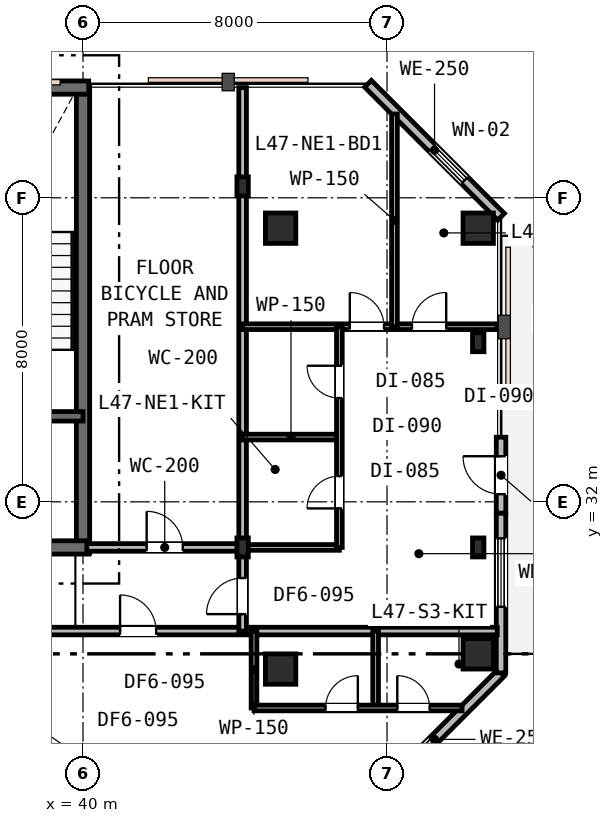
"""IFC4 building model, lengths in metres.
Left out: names, types, materials, properties, quantities, classifications, styles, units other than length and angle.
Written with IfcOpenShell. Run it as: python <this file> out.ifc"""

import sys

from ifc_helpers import new_model, si_unit, direction, frame, frame_2d, origin, origin_2d, place, context, subcontext, project, spatial, rectangle, i_section, extrude, element, fill, save


model = new_model("IFC4")
c1 = context("Model", 3, precision=1e-05, world=origin(), true_north=direction((0.0, 1.0)))
c2 = subcontext(c1, "Body", "Model", "MODEL_VIEW")
j1 = project(units=[si_unit("LENGTHUNIT", "METRE"), si_unit("PLANEANGLEUNIT", "RADIAN")], contexts=[c1])
p1 = place(None, origin())
s1 = spatial("IfcSite", under=j1, at=p1, CompositionType="ELEMENT")
p2 = place(p1, origin())
s2 = spatial("IfcBuilding", under=s1, at=p2, CompositionType="ELEMENT")
p3 = place(p2, frame((0.0, 0.0, 183.0)))
s3 = spatial("IfcBuildingStorey", under=s2, at=p3, CompositionType="ELEMENT", Elevation=183.0)
p4 = place(p3, frame((40.0, 30.65, 0.0), z_axis=(0.0, 0.0, 1.0), x_axis=(0.0, 1.0, 0.0)))
e1 = element("IfcWall", 1, at=p4, inside=s3, PredefinedType="SHEAR", context=c2, shape_type="SweptSolid", body=[
    extrude(rectangle(XDim=12.3, YDim=0.35, at=frame_2d((6.15, 0.0))), origin(), (0.0, 0.0, 1.0), 3.6),
])
p5 = place(p3, frame((15.85, 42.9, 0.0), z_axis=(0.0, 0.0, 1.0), x_axis=(1.0, 0.0, 0.0)))
e2 = element("IfcWall", 2, at=p5, inside=s3, PredefinedType="SHEAR", context=c2, shape_type="SweptSolid", body=[
    extrude(rectangle(XDim=24.3, YDim=0.35, at=frame_2d((12.15, 0.0))), origin(), (0.0, 0.0, 1.0), 3.6),
])
p6 = place(p5, frame((1.6, 0.0, 0.95)))
e3 = element("IfcOpeningElement", 3, at=p6, cuts=e2, PredefinedType="OPENING", context=c2, shape_type="SweptSolid", body=[
    extrude(rectangle(XDim=1.2, YDim=1.6, at=frame_2d((0.6, 0.8))), frame((0.0, 0.185, 0.0), z_axis=(0.0, -1.0, 0.0), x_axis=(1.0, 0.0, 0.0)), (0.0, 0.0, 1.0), 0.37),
])
p7 = place(p5, frame((16.5, 0.0, 0.95)))
e4 = element("IfcOpeningElement", 4, at=p7, cuts=e2, PredefinedType="OPENING", context=c2, shape_type="SweptSolid", body=[
    extrude(rectangle(XDim=1.2, YDim=1.6, at=frame_2d((0.6, 0.8))), frame((0.0, 0.185, 0.0), z_axis=(0.0, -1.0, 0.0), x_axis=(1.0, 0.0, 0.0)), (0.0, 0.0, 1.0), 0.37),
])
p8 = place(p5, frame((21.6, 0.0, 0.95)))
e5 = element("IfcOpeningElement", 5, at=p8, cuts=e2, PredefinedType="OPENING", context=c2, shape_type="SweptSolid", body=[
    extrude(rectangle(XDim=1.2, YDim=1.6, at=frame_2d((0.6, 0.8))), frame((0.0, 0.185, 0.0), z_axis=(0.0, -1.0, 0.0), x_axis=(1.0, 0.0, 0.0)), (0.0, 0.0, 1.0), 0.37),
])
p9 = place(p3, frame((28.95, 30.8, 0.0), z_axis=(0.0, 0.0, 1.0), x_axis=(1.0, 0.0, 0.0)))
e6 = element("IfcWall", 6, at=p9, inside=s3, PredefinedType="SHEAR", context=c2, shape_type="SweptSolid", body=[
    extrude(rectangle(XDim=11.2, YDim=0.35, at=frame_2d((5.6, 0.0))), origin(), (0.0, 0.0, 1.0), 3.6),
])
p10 = place(p9, frame((7.65, 0.0, 0.0)))
e7 = element("IfcOpeningElement", 7, at=p10, cuts=e6, PredefinedType="OPENING", context=c2, shape_type="SweptSolid", body=[
    extrude(rectangle(XDim=1.1, YDim=2.15, at=frame_2d((0.55, 1.075))), frame((0.0, 0.185, 0.0), z_axis=(0.0, -1.0, 0.0), x_axis=(1.0, 0.0, 0.0)), (0.0, 0.0, 1.0), 0.37),
])
p11 = place(p3, frame((33.95, 34.25, 0.0), z_axis=(0.0, 0.0, 1.0), x_axis=(1.0, 0.0, 0.0)))
e8 = element("IfcWall", 8, at=p11, inside=s3, PredefinedType="SHEAR", context=c2, shape_type="SweptSolid", body=[
    extrude(rectangle(XDim=6.05, YDim=0.25, at=frame_2d((3.025, 0.0))), origin(), (0.0, 0.0, 1.0), 3.6),
])
p12 = place(p11, frame((3.7, 0.0, 0.0)))
e9 = element("IfcOpeningElement", 9, at=p12, cuts=e8, PredefinedType="OPENING", context=c2, shape_type="SweptSolid", body=[
    extrude(rectangle(XDim=1.0, YDim=2.15, at=frame_2d((0.5, 1.075))), frame((0.0, 0.135, 0.0), z_axis=(0.0, -1.0, 0.0), x_axis=(1.0, 0.0, 0.0)), (0.0, 0.0, 1.0), 0.27),
])
p13 = place(p11, frame((0.55, 0.0, 0.0)))
e10 = element("IfcOpeningElement", 10, at=p13, cuts=e8, PredefinedType="OPENING", context=c2, shape_type="SweptSolid", body=[
    extrude(rectangle(XDim=1.1, YDim=2.15, at=frame_2d((0.55, 1.075))), frame((0.0, 0.135, 0.0), z_axis=(0.0, -1.0, 0.0), x_axis=(1.0, 0.0, 0.0)), (0.0, 0.0, 1.0), 0.27),
])
for number, where, z_axis, x_axis in (
    (11, (45.2, 27.6, 0.0), (0.0, 0.0, 1.0), (1.0, 0.0, 0.0)),
    (12, (45.2, 39.2, 0.0), (0.0, 0.0, 1.0), (1.0, 0.0, 0.0)),
    (13, (50.4, 28.0, 0.0), (0.0, 0.0, 1.0), (1.0, 0.0, 0.0)),
    (14, (50.4, 39.2, 0.0), (0.0, 0.0, 1.0), (1.0, 0.0, 0.0)),
):
    element("IfcColumn", number, at=place(p3, frame(where, z_axis=z_axis, x_axis=x_axis)), inside=s3, PredefinedType="COLUMN", context=c2, shape_type="SweptSolid", body=[
        extrude(rectangle(XDim=0.8, YDim=0.8, at=origin_2d()), origin(), (0.0, 0.0, 1.0), 3.6),
    ])
for number, where, z_axis, x_axis in (
    (15, (44.2, 30.8, 0.0), (0.0, 0.0, 1.0), (1.0, 0.0, 0.0)),
    (16, (44.2, 40.3, 0.0), (0.0, 0.0, 1.0), (1.0, 0.0, 0.0)),
    (17, (50.4, 30.8, 0.0), (0.0, 0.0, 1.0), (1.0, 0.0, 0.0)),
    (18, (50.4, 36.2, 0.0), (0.0, 0.0, 1.0), (1.0, 0.0, 0.0)),
):
    element("IfcColumn", number, at=place(p3, frame(where, z_axis=z_axis, x_axis=x_axis)), inside=s3, PredefinedType="COLUMN", context=c2, shape_type="SweptSolid", body=[
        extrude(i_section(OverallWidth=0.3, OverallDepth=0.5, WebThickness=0.015, FlangeThickness=0.028, FilletRadius=0.027, at=origin_2d()), origin(), (0.0, 0.0, 1.0), 3.6),
    ])
p14 = place(p3, frame((47.5, 24.0, 0.0), z_axis=(0.0, 0.0, 1.0), x_axis=(0.707106781187, 0.707106781187, 0.0)))
e19 = element("IfcWall", 19, at=p14, inside=s3, PredefinedType="STANDARD", context=c2, shape_type="SweptSolid", body=[
    extrude(rectangle(XDim=4.95, YDim=0.25, at=frame_2d((2.475, 0.0))), origin(), (0.0, 0.0, 1.0), 3.33),
])
p15 = place(p14, frame((1.196, 0.0, 0.85)))
e20 = element("IfcOpeningElement", 20, at=p15, cuts=e19, PredefinedType="OPENING", context=c2, shape_type="SweptSolid", body=[
    extrude(rectangle(XDim=1.2, YDim=1.6, at=frame_2d((0.6, 0.8))), frame((0.0, 0.135, 0.0), z_axis=(0.0, -1.0, 0.0), x_axis=(1.0, 0.0, 0.0)), (0.0, 0.0, 1.0), 0.27),
])
p16 = place(p3, frame((51.0, 31.7, 0.0), z_axis=(0.0, 0.0, 1.0), x_axis=(0.0, 1.0, 0.0)))
e21 = element("IfcWall", 21, at=p16, inside=s3, PredefinedType="STANDARD", context=c2, shape_type="SweptSolid", body=[
    extrude(rectangle(XDim=2.0, YDim=0.25, at=frame_2d((1.0, 0.0))), origin(), (0.0, 0.0, 1.0), 3.33),
])
p17 = place(p16, frame((0.5, 0.0, 0.0)))
e22 = element("IfcOpeningElement", 22, at=p17, cuts=e21, PredefinedType="OPENING", context=c2, shape_type="SweptSolid", body=[
    extrude(rectangle(XDim=1.0, YDim=2.15, at=frame_2d((0.5, 1.075))), frame((0.0, 0.135, 0.0), z_axis=(0.0, -1.0, 0.0), x_axis=(1.0, 0.0, 0.0)), (0.0, 0.0, 1.0), 0.27),
])
p18 = place(p3, frame((51.0, 27.5, 0.0), z_axis=(0.0, 0.0, 1.0), x_axis=(0.0, 1.0, 0.0)))
e23 = element("IfcWall", 23, at=p18, inside=s3, PredefinedType="STANDARD", context=c2, shape_type="SweptSolid", body=[
    extrude(rectangle(XDim=4.2, YDim=0.25, at=frame_2d((2.1, 0.0))), origin(), (0.0, 0.0, 1.0), 3.33),
])
p19 = place(p18, frame((1.74, 0.0, 0.75)))
e24 = element("IfcOpeningElement", 24, at=p19, cuts=e23, PredefinedType="OPENING", context=c2, shape_type="SweptSolid", body=[
    extrude(rectangle(XDim=1.8, YDim=1.85, at=frame_2d((0.9, 0.925))), frame((0.0, 0.135, 0.0), z_axis=(0.0, -1.0, 0.0), x_axis=(1.0, 0.0, 0.0)), (0.0, 0.0, 1.0), 0.27),
])
p20 = place(p3, frame((51.0, 39.5, 0.0), z_axis=(0.0, 0.0, 1.0), x_axis=(-0.707106781187, 0.707106781187, 0.0)))
e25 = element("IfcWall", 25, at=p20, inside=s3, PredefinedType="STANDARD", context=c2, shape_type="SweptSolid", body=[
    extrude(rectangle(XDim=4.95, YDim=0.25, at=frame_2d((2.475, 0.0))), origin(), (0.0, 0.0, 1.0), 3.33),
])
p21 = place(p20, frame((1.357, 0.0, 0.85)))
e26 = element("IfcOpeningElement", 26, at=p21, cuts=e25, PredefinedType="OPENING", context=c2, shape_type="SweptSolid", body=[
    extrude(rectangle(XDim=1.2, YDim=1.6, at=frame_2d((0.6, 0.8))), frame((0.0, 0.135, 0.0), z_axis=(0.0, -1.0, 0.0), x_axis=(1.0, 0.0, 0.0)), (0.0, 0.0, 1.0), 0.27),
])
p22 = place(p3, frame((21.6, 28.6, 0.0), z_axis=(0.0, 0.0, 1.0), x_axis=(1.0, 0.0, 0.0)))
e27 = element("IfcWall", 27, at=p22, inside=s3, PredefinedType="PARTITIONING", context=c2, shape_type="SweptSolid", body=[
    extrude(rectangle(XDim=29.3, YDim=0.2, at=frame_2d((14.65, 0.0))), origin(), (0.0, 0.0, 1.0), 2.92),
])
p23 = place(p22, frame((3.293, 0.0, 0.0)))
e28 = element("IfcOpeningElement", 28, at=p23, cuts=e27, PredefinedType="OPENING", context=c2, shape_type="SweptSolid", body=[
    extrude(rectangle(XDim=0.95, YDim=2.15, at=frame_2d((0.475, 1.075))), frame((0.0, 0.11, 0.0), z_axis=(0.0, -1.0, 0.0), x_axis=(1.0, 0.0, 0.0)), (0.0, 0.0, 1.0), 0.22),
])
p24 = place(p22, frame((10.493, 0.0, 0.0)))
e29 = element("IfcOpeningElement", 29, at=p24, cuts=e27, PredefinedType="OPENING", context=c2, shape_type="SweptSolid", body=[
    extrude(rectangle(XDim=0.95, YDim=2.15, at=frame_2d((0.475, 1.075))), frame((0.0, 0.11, 0.0), z_axis=(0.0, -1.0, 0.0), x_axis=(1.0, 0.0, 0.0)), (0.0, 0.0, 1.0), 0.22),
])
p25 = place(p22, frame((19.375, 0.0, 0.0)))
e30 = element("IfcOpeningElement", 30, at=p25, cuts=e27, PredefinedType="OPENING", context=c2, shape_type="SweptSolid", body=[
    extrude(rectangle(XDim=0.95, YDim=2.15, at=frame_2d((0.475, 1.075))), frame((0.0, 0.11, 0.0), z_axis=(0.0, -1.0, 0.0), x_axis=(1.0, 0.0, 0.0)), (0.0, 0.0, 1.0), 0.22),
])
p26 = place(p3, frame((40.1, 30.8, 0.0), z_axis=(0.0, 0.0, 1.0), x_axis=(1.0, 0.0, 0.0)))
e31 = element("IfcWall", 31, at=p26, inside=s3, PredefinedType="PARTITIONING", context=c2, shape_type="SweptSolid", body=[
    extrude(rectangle(XDim=4.1, YDim=0.2, at=frame_2d((2.05, 0.0))), origin(), (0.0, 0.0, 1.0), 2.92),
])
p27 = place(p26, frame((1.575, 0.0, 0.0)))
e32 = element("IfcOpeningElement", 32, at=p27, cuts=e31, PredefinedType="OPENING", context=c2, shape_type="SweptSolid", body=[
    extrude(rectangle(XDim=0.95, YDim=2.15, at=frame_2d((0.475, 1.075))), frame((0.0, 0.11, 0.0), z_axis=(0.0, -1.0, 0.0), x_axis=(1.0, 0.0, 0.0)), (0.0, 0.0, 1.0), 0.22),
])
p28 = place(p3, frame((44.2, 28.6, 0.0), z_axis=(0.0, 0.0, 1.0), x_axis=(0.0, 1.0, 0.0)))
e33 = element("IfcWall", 33, at=p28, inside=s3, PredefinedType="PARTITIONING", context=c2, shape_type="SweptSolid", body=[
    extrude(rectangle(XDim=14.3, YDim=0.2, at=frame_2d((7.15, 0.0))), origin(), (0.0, 0.0, 1.0), 2.92),
])
p29 = place(p28, frame((0.445, 0.0, 0.0)))
e34 = element("IfcOpeningElement", 34, at=p29, cuts=e33, PredefinedType="OPENING", context=c2, shape_type="SweptSolid", body=[
    extrude(rectangle(XDim=0.95, YDim=2.15, at=frame_2d((0.475, 1.075))), frame((0.0, 0.11, 0.0), z_axis=(0.0, -1.0, 0.0), x_axis=(1.0, 0.0, 0.0)), (0.0, 0.0, 1.0), 0.22),
])
for number, where, z_axis, x_axis in (
    (35, (44.2, 30.8, 0.0), (0.0, 0.0, 1.0), (1.0, 0.0, 0.0)),
    (36, (44.2, 33.704, 0.0), (0.0, 0.0, 1.0), (1.0, 0.0, 0.0)),
):
    element("IfcWall", number, at=place(p3, frame(where, z_axis=z_axis, x_axis=x_axis)), inside=s3, PredefinedType="PARTITIONING", context=c2, shape_type="SweptSolid", body=[
        extrude(rectangle(XDim=2.546, YDim=0.15, at=frame_2d((1.273, 0.0))), origin(), (0.0, 0.0, 1.0), 2.92),
    ])
p30 = place(p3, frame((44.2, 36.608, 0.0), z_axis=(0.0, 0.0, 1.0), x_axis=(1.0, 0.0, 0.0)))
e37 = element("IfcWall", 37, at=p30, inside=s3, PredefinedType="PARTITIONING", context=c2, shape_type="SweptSolid", body=[
    extrude(rectangle(XDim=6.7, YDim=0.15, at=frame_2d((3.35, 0.0))), origin(), (0.0, 0.0, 1.0), 2.92),
])
p31 = place(p30, frame((2.821, 0.0, 0.0)))
e38 = element("IfcOpeningElement", 38, at=p31, cuts=e37, PredefinedType="OPENING", context=c2, shape_type="SweptSolid", body=[
    extrude(rectangle(XDim=0.9, YDim=2.15, at=frame_2d((0.45, 1.075))), frame((0.0, 0.085, 0.0), z_axis=(0.0, -1.0, 0.0), x_axis=(1.0, 0.0, 0.0)), (0.0, 0.0, 1.0), 0.17),
])
p32 = place(p30, frame((4.457, 0.0, 0.0)))
e39 = element("IfcOpeningElement", 39, at=p32, cuts=e37, PredefinedType="OPENING", context=c2, shape_type="SweptSolid", body=[
    extrude(rectangle(XDim=0.9, YDim=2.15, at=frame_2d((0.45, 1.075))), frame((0.0, 0.085, 0.0), z_axis=(0.0, -1.0, 0.0), x_axis=(1.0, 0.0, 0.0)), (0.0, 0.0, 1.0), 0.17),
])
p33 = place(p3, frame((46.746, 30.8, 0.0), z_axis=(0.0, 0.0, 1.0), x_axis=(0.0, 1.0, 0.0)))
e40 = element("IfcWall", 40, at=p33, inside=s3, PredefinedType="PARTITIONING", context=c2, shape_type="SweptSolid", body=[
    extrude(rectangle(XDim=5.808, YDim=0.15, at=frame_2d((2.904, 0.0))), origin(), (0.0, 0.0, 1.0), 2.92),
])
p34 = place(p33, frame((1.027, 0.0, 0.0)))
e41 = element("IfcOpeningElement", 41, at=p34, cuts=e40, PredefinedType="OPENING", context=c2, shape_type="SweptSolid", body=[
    extrude(rectangle(XDim=0.85, YDim=2.15, at=frame_2d((0.425, 1.075))), frame((0.0, 0.085, 0.0), z_axis=(0.0, -1.0, 0.0), x_axis=(1.0, 0.0, 0.0)), (0.0, 0.0, 1.0), 0.17),
])
p35 = place(p33, frame((3.931, 0.0, 0.0)))
e42 = element("IfcOpeningElement", 42, at=p35, cuts=e40, PredefinedType="OPENING", context=c2, shape_type="SweptSolid", body=[
    extrude(rectangle(XDim=0.85, YDim=2.15, at=frame_2d((0.425, 1.075))), frame((0.0, 0.085, 0.0), z_axis=(0.0, -1.0, 0.0), x_axis=(1.0, 0.0, 0.0)), (0.0, 0.0, 1.0), 0.17),
])
p36 = place(p3, frame((48.196, 36.608, 0.0), z_axis=(0.0, 0.0, 1.0), x_axis=(0.0, 1.0, 0.0)))
e43 = element("IfcWall", 43, at=p36, inside=s3, PredefinedType="PARTITIONING", context=c2, shape_type="SweptSolid", body=[
    extrude(rectangle(XDim=5.596, YDim=0.15, at=frame_2d((2.798, 0.0))), origin(), (0.0, 0.0, 1.0), 3.02),
])
for number, where, z_axis, x_axis in (
    (44, (44.5, 26.576, 0.0), (0.0, 0.0, 1.0), (0.0, 1.0, 0.0)),
    (45, (47.7, 26.576, 0.0), (0.0, 0.0, 1.0), (0.0, 1.0, 0.0)),
):
    element("IfcWall", number, at=place(p3, frame(where, z_axis=z_axis, x_axis=x_axis)), inside=s3, PredefinedType="PARTITIONING", context=c2, shape_type="SweptSolid", body=[
        extrude(rectangle(XDim=2.024, YDim=0.15, at=frame_2d((1.012, 0.0))), origin(), (0.0, 0.0, 1.0), 3.33),
    ])
p37 = place(p3, frame((44.5, 26.576, 0.0), z_axis=(0.0, 0.0, 1.0), x_axis=(1.0, 0.0, 0.0)))
e46 = element("IfcWall", 46, at=p37, inside=s3, PredefinedType="PARTITIONING", context=c2, shape_type="SweptSolid", body=[
    extrude(rectangle(XDim=5.476, YDim=0.15, at=frame_2d((2.738, 0.0))), origin(), (0.0, 0.0, 1.0), 3.33),
])
p38 = place(p37, frame((1.882, 0.0, 0.0)))
e47 = element("IfcOpeningElement", 47, at=p38, cuts=e46, PredefinedType="OPENING", context=c2, shape_type="SweptSolid", body=[
    extrude(rectangle(XDim=0.85, YDim=2.15, at=frame_2d((0.425, 1.075))), frame((0.0, 0.085, 0.0), z_axis=(0.0, -1.0, 0.0), x_axis=(1.0, 0.0, 0.0)), (0.0, 0.0, 1.0), 0.17),
])
p39 = place(p37, frame((3.77, 0.0, 0.0)))
e48 = element("IfcOpeningElement", 48, at=p39, cuts=e46, PredefinedType="OPENING", context=c2, shape_type="SweptSolid", body=[
    extrude(rectangle(XDim=0.85, YDim=2.15, at=frame_2d((0.425, 1.075))), frame((0.0, 0.085, 0.0), z_axis=(0.0, -1.0, 0.0), x_axis=(1.0, 0.0, 0.0)), (0.0, 0.0, 1.0), 0.17),
])
p40 = place(p15, origin())
e49 = element("IfcWindow", 49, at=p40, inside=s3, PartitioningType="SINGLE_PANEL", PredefinedType="WINDOW", context=c2, shape_type="SweptSolid", body=[
    extrude(rectangle(XDim=1.2, YDim=1.6, at=frame_2d((0.6, 0.8))), frame((0.0, 0.03, 0.0), z_axis=(0.0, -1.0, 0.0), x_axis=(1.0, 0.0, 0.0)), (0.0, 0.0, 1.0), 0.06),
])
fill(e20, e49)
p41 = place(p17, origin())
e50 = element("IfcDoor", 50, at=p41, inside=s3, OperationType="SINGLE_SWING_RIGHT", PredefinedType="DOOR", context=c2, shape_type="SweptSolid", body=[
    extrude(rectangle(XDim=1.0, YDim=2.15, at=frame_2d((0.5, 1.075))), frame((0.0, 0.025, 0.0), z_axis=(0.0, -1.0, 0.0), x_axis=(1.0, 0.0, 0.0)), (0.0, 0.0, 1.0), 0.05),
])
fill(e22, e50)
p42 = place(p19, origin())
e51 = element("IfcWindow", 51, at=p42, inside=s3, PartitioningType="SINGLE_PANEL", PredefinedType="WINDOW", context=c2, shape_type="SweptSolid", body=[
    extrude(rectangle(XDim=1.8, YDim=1.85, at=frame_2d((0.9, 0.925))), frame((0.0, 0.03, 0.0), z_axis=(0.0, -1.0, 0.0), x_axis=(1.0, 0.0, 0.0)), (0.0, 0.0, 1.0), 0.06),
])
fill(e24, e51)
p43 = place(p21, origin())
e52 = element("IfcWindow", 52, at=p43, inside=s3, PartitioningType="SINGLE_PANEL", PredefinedType="WINDOW", context=c2, shape_type="SweptSolid", body=[
    extrude(rectangle(XDim=1.2, YDim=1.6, at=frame_2d((0.6, 0.8))), frame((0.0, 0.03, 0.0), z_axis=(0.0, -1.0, 0.0), x_axis=(1.0, 0.0, 0.0)), (0.0, 0.0, 1.0), 0.06),
])
fill(e26, e52)
p44 = place(p27, origin())
e53 = element("IfcDoor", 53, at=p44, inside=s3, OperationType="SINGLE_SWING_LEFT", PredefinedType="DOOR", context=c2, shape_type="SweptSolid", body=[
    extrude(rectangle(XDim=0.95, YDim=2.15, at=frame_2d((0.475, 1.075))), frame((0.0, 0.025, 0.0), z_axis=(0.0, -1.0, 0.0), x_axis=(1.0, 0.0, 0.0)), (0.0, 0.0, 1.0), 0.05),
])
fill(e32, e53)
p45 = place(p29, origin())
e54 = element("IfcDoor", 54, at=p45, inside=s3, OperationType="SINGLE_SWING_LEFT", PredefinedType="DOOR", context=c2, shape_type="SweptSolid", body=[
    extrude(rectangle(XDim=0.95, YDim=2.15, at=frame_2d((0.475, 1.075))), frame((0.0, 0.025, 0.0), z_axis=(0.0, -1.0, 0.0), x_axis=(1.0, 0.0, 0.0)), (0.0, 0.0, 1.0), 0.05),
])
fill(e34, e54)
p46 = place(p34, origin())
e55 = element("IfcDoor", 55, at=p46, inside=s3, OperationType="SINGLE_SWING_LEFT", PredefinedType="DOOR", context=c2, shape_type="SweptSolid", body=[
    extrude(rectangle(XDim=0.85, YDim=2.15, at=frame_2d((0.425, 1.075))), frame((0.0, 0.025, 0.0), z_axis=(0.0, -1.0, 0.0), x_axis=(1.0, 0.0, 0.0)), (0.0, 0.0, 1.0), 0.05),
])
fill(e41, e55)
p47 = place(p35, origin())
e56 = element("IfcDoor", 56, at=p47, inside=s3, OperationType="SINGLE_SWING_RIGHT", PredefinedType="DOOR", context=c2, shape_type="SweptSolid", body=[
    extrude(rectangle(XDim=0.85, YDim=2.15, at=frame_2d((0.425, 1.075))), frame((0.0, 0.025, 0.0), z_axis=(0.0, -1.0, 0.0), x_axis=(1.0, 0.0, 0.0)), (0.0, 0.0, 1.0), 0.05),
])
fill(e42, e56)
p48 = place(p31, origin())
e57 = element("IfcDoor", 57, at=p48, inside=s3, OperationType="SINGLE_SWING_LEFT", PredefinedType="DOOR", context=c2, shape_type="SweptSolid", body=[
    extrude(rectangle(XDim=0.9, YDim=2.15, at=frame_2d((0.45, 1.075))), frame((0.0, 0.025, 0.0), z_axis=(0.0, -1.0, 0.0), x_axis=(1.0, 0.0, 0.0)), (0.0, 0.0, 1.0), 0.05),
])
fill(e38, e57)
p49 = place(p32, origin())
e58 = element("IfcDoor", 58, at=p49, inside=s3, OperationType="SINGLE_SWING_RIGHT", PredefinedType="DOOR", context=c2, shape_type="SweptSolid", body=[
    extrude(rectangle(XDim=0.9, YDim=2.15, at=frame_2d((0.45, 1.075))), frame((0.0, 0.025, 0.0), z_axis=(0.0, -1.0, 0.0), x_axis=(1.0, 0.0, 0.0)), (0.0, 0.0, 1.0), 0.05),
])
fill(e39, e58)
p50 = place(p25, origin())
e59 = element("IfcDoor", 59, at=p50, inside=s3, OperationType="SINGLE_SWING_LEFT", PredefinedType="DOOR", context=c2, shape_type="SweptSolid", body=[
    extrude(rectangle(XDim=0.95, YDim=2.15, at=frame_2d((0.475, 1.075))), frame((0.0, 0.025, 0.0), z_axis=(0.0, -1.0, 0.0), x_axis=(1.0, 0.0, 0.0)), (0.0, 0.0, 1.0), 0.05),
])
fill(e30, e59)
p51 = place(p38, origin())
e60 = element("IfcDoor", 60, at=p51, inside=s3, OperationType="SINGLE_SWING_RIGHT", PredefinedType="DOOR", context=c2, shape_type="SweptSolid", body=[
    extrude(rectangle(XDim=0.85, YDim=2.15, at=frame_2d((0.425, 1.075))), frame((0.0, 0.025, 0.0), z_axis=(0.0, -1.0, 0.0), x_axis=(1.0, 0.0, 0.0)), (0.0, 0.0, 1.0), 0.05),
])
fill(e47, e60)
p52 = place(p39, origin())
e61 = element("IfcDoor", 61, at=p52, inside=s3, OperationType="SINGLE_SWING_LEFT", PredefinedType="DOOR", context=c2, shape_type="SweptSolid", body=[
    extrude(rectangle(XDim=0.85, YDim=2.15, at=frame_2d((0.425, 1.075))), frame((0.0, 0.025, 0.0), z_axis=(0.0, -1.0, 0.0), x_axis=(1.0, 0.0, 0.0)), (0.0, 0.0, 1.0), 0.05),
])
fill(e48, e61)
save(model, sys.argv[1])
